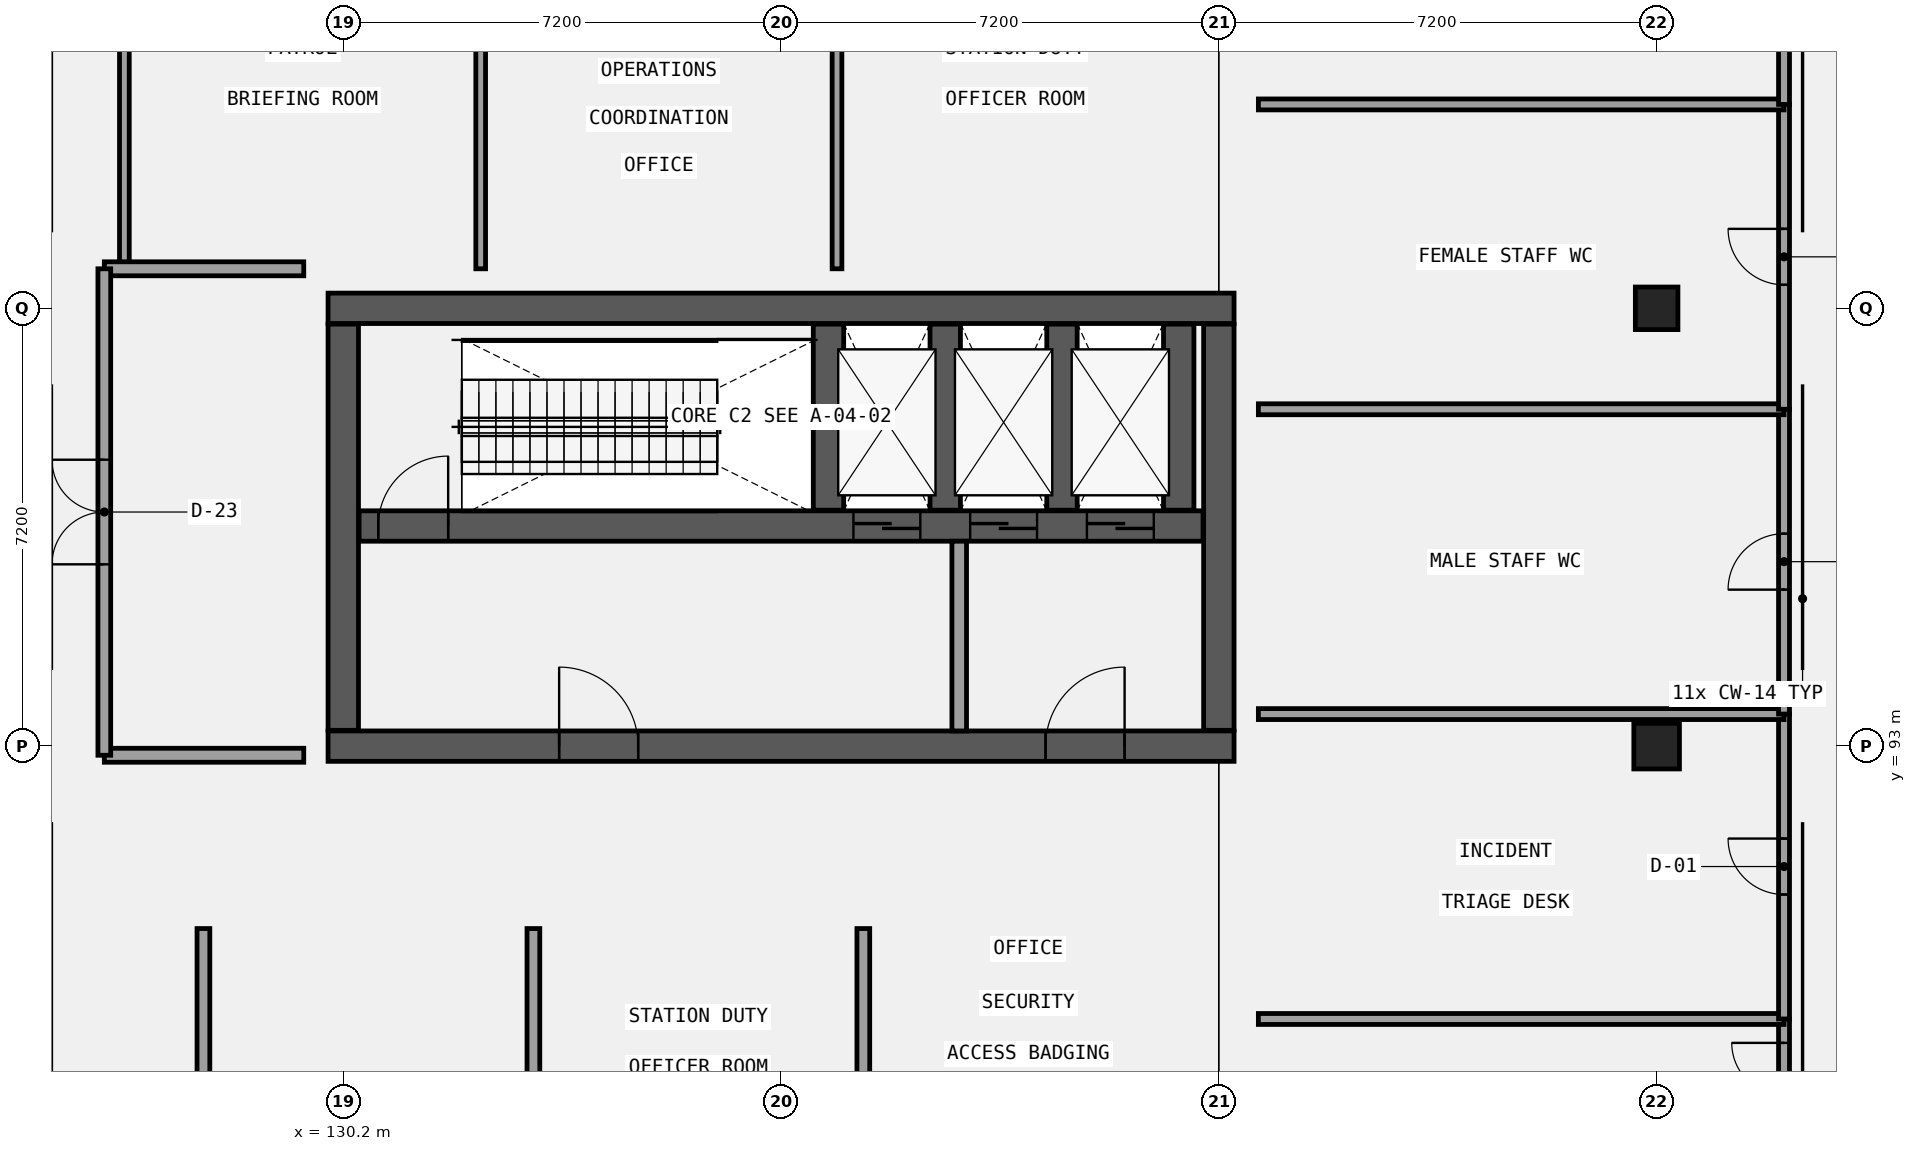
"""IFC4 building model, lengths in metres.
Left out: names, types, materials, properties, quantities, classifications, styles, units other than length and angle.
Written with IfcOpenShell. Run it as: python <this file> out.ifc"""

import sys

from ifc_helpers import new_model, si_unit, direction, frame, frame_2d, origin, origin_2d, place, context, subcontext, project, spatial, rectangle, extrude, element, fill, save


model = new_model("IFC4")
c1 = context("Model", 3, precision=1e-05, world=origin(), true_north=direction((0.0, 1.0)))
c2 = subcontext(c1, "Body", "Model", "MODEL_VIEW")
j1 = project(units=[si_unit("LENGTHUNIT", "METRE"), si_unit("PLANEANGLEUNIT", "RADIAN")], contexts=[c1])
p1 = place(None, origin())
s1 = spatial("IfcSite", under=j1, at=p1, CompositionType="ELEMENT")
p2 = place(p1, origin())
s2 = spatial("IfcBuilding", under=s1, at=p2, CompositionType="ELEMENT")
p3 = place(p2, origin())
s3 = spatial("IfcBuildingStorey", under=s2, at=p3, CompositionType="ELEMENT", Elevation=0.0)
p4 = place(p3, frame((129.95, 100.2, 0.0), z_axis=(0.0, 0.0, 1.0), x_axis=(1.0, 0.0, 0.0)))
e1 = element("IfcWall", 1, at=p4, inside=s3, PredefinedType="SHEAR", context=c2, shape_type="SweptSolid", body=[
    extrude(rectangle(XDim=14.9, YDim=0.5, at=frame_2d((7.45, 0.0))), origin(), (0.0, 0.0, 1.0), 5.4),
])
p5 = place(p3, frame((129.95, 93.0, 0.0), z_axis=(0.0, 0.0, 1.0), x_axis=(1.0, 0.0, 0.0)))
e2 = element("IfcWall", 2, at=p5, inside=s3, PredefinedType="SHEAR", context=c2, shape_type="SweptSolid", body=[
    extrude(rectangle(XDim=14.9, YDim=0.5, at=frame_2d((7.45, 0.0))), origin(), (0.0, 0.0, 1.0), 5.4),
])
p6 = place(p5, frame((3.8, 0.0, 0.0)))
e3 = element("IfcOpeningElement", 3, at=p6, cuts=e2, PredefinedType="OPENING", context=c2, shape_type="SweptSolid", body=[
    extrude(rectangle(XDim=1.3, YDim=2.2, at=frame_2d((0.65, 1.1))), frame((0.0, 0.26, 0.0), z_axis=(0.0, -1.0, 0.0), x_axis=(1.0, 0.0, 0.0)), (0.0, 0.0, 1.0), 0.52),
])
p7 = place(p5, frame((11.8, 0.0, 0.0)))
e4 = element("IfcOpeningElement", 4, at=p7, cuts=e2, PredefinedType="OPENING", context=c2, shape_type="SweptSolid", body=[
    extrude(rectangle(XDim=1.3, YDim=2.2, at=frame_2d((0.65, 1.1))), frame((0.0, 0.26, 0.0), z_axis=(0.0, -1.0, 0.0), x_axis=(1.0, 0.0, 0.0)), (0.0, 0.0, 1.0), 0.52),
])
for number, where, z_axis, x_axis in (
    (5, (130.2, 93.26, 0.0), (0.0, 0.0, 1.0), (0.0, 1.0, 0.0)),
    (6, (144.6, 93.26, 0.0), (0.0, 0.0, 1.0), (0.0, 1.0, 0.0)),
):
    element("IfcWall", number, at=place(p3, frame(where, z_axis=z_axis, x_axis=x_axis)), inside=s3, PredefinedType="SHEAR", context=c2, shape_type="SweptSolid", body=[
        extrude(rectangle(XDim=6.68, YDim=0.5, at=frame_2d((3.34, 0.0))), origin(), (0.0, 0.0, 1.0), 5.4),
    ])
p8 = place(p3, frame((130.46, 96.62, 0.0), z_axis=(0.0, 0.0, 1.0), x_axis=(1.0, 0.0, 0.0)))
e7 = element("IfcWall", 7, at=p8, inside=s3, PredefinedType="SHEAR", context=c2, shape_type="SweptSolid", body=[
    extrude(rectangle(XDim=13.88, YDim=0.5, at=frame_2d((6.94, 0.0))), origin(), (0.0, 0.0, 1.0), 5.4),
])
p9 = place(p8, frame((8.13, 0.0, 0.0)))
e8 = element("IfcOpeningElement", 8, at=p9, cuts=e7, PredefinedType="OPENING", context=c2, shape_type="SweptSolid", body=[
    extrude(rectangle(XDim=1.1, YDim=2.15, at=frame_2d((0.55, 1.075))), frame((0.0, 0.26, 0.0), z_axis=(0.0, -1.0, 0.0), x_axis=(1.0, 0.0, 0.0)), (0.0, 0.0, 1.0), 0.52),
])
p10 = place(p8, frame((10.05, 0.0, 0.0)))
e9 = element("IfcOpeningElement", 9, at=p10, cuts=e7, PredefinedType="OPENING", context=c2, shape_type="SweptSolid", body=[
    extrude(rectangle(XDim=1.1, YDim=2.15, at=frame_2d((0.55, 1.075))), frame((0.0, 0.26, 0.0), z_axis=(0.0, -1.0, 0.0), x_axis=(1.0, 0.0, 0.0)), (0.0, 0.0, 1.0), 0.52),
])
p11 = place(p8, frame((11.97, 0.0, 0.0)))
e10 = element("IfcOpeningElement", 10, at=p11, cuts=e7, PredefinedType="OPENING", context=c2, shape_type="SweptSolid", body=[
    extrude(rectangle(XDim=1.1, YDim=2.15, at=frame_2d((0.55, 1.075))), frame((0.0, 0.26, 0.0), z_axis=(0.0, -1.0, 0.0), x_axis=(1.0, 0.0, 0.0)), (0.0, 0.0, 1.0), 0.52),
])
p12 = place(p8, frame((0.315, 0.0, 0.0)))
e11 = element("IfcOpeningElement", 11, at=p12, cuts=e7, PredefinedType="OPENING", context=c2, shape_type="SweptSolid", body=[
    extrude(rectangle(XDim=1.15, YDim=2.15, at=frame_2d((0.575, 1.075))), frame((0.0, 0.26, 0.0), z_axis=(0.0, -1.0, 0.0), x_axis=(1.0, 0.0, 0.0)), (0.0, 0.0, 1.0), 0.52),
])
for number, where, z_axis, x_axis in (
    (12, (138.18, 96.88, 0.0), (0.0, 0.0, 1.0), (0.0, 1.0, 0.0)),
    (13, (140.1, 96.88, 0.0), (0.0, 0.0, 1.0), (0.0, 1.0, 0.0)),
    (14, (142.02, 96.88, 0.0), (0.0, 0.0, 1.0), (0.0, 1.0, 0.0)),
    (15, (143.94, 96.88, 0.0), (0.0, 0.0, 1.0), (0.0, 1.0, 0.0)),
):
    element("IfcWall", number, at=place(p3, frame(where, z_axis=z_axis, x_axis=x_axis)), inside=s3, PredefinedType="SHEAR", context=c2, shape_type="SweptSolid", body=[
        extrude(rectangle(XDim=3.06, YDim=0.5, at=frame_2d((1.53, 0.0))), origin(), (0.0, 0.0, 1.0), 5.4),
    ])
p13 = place(p3, frame((151.8, 93.0, 0.0), z_axis=(0.0, 0.0, 1.0), x_axis=(1.0, 0.0, 0.0)))
e16 = element("IfcColumn", 16, at=p13, inside=s3, PredefinedType="COLUMN", context=c2, shape_type="SweptSolid", body=[
    extrude(rectangle(XDim=0.75, YDim=0.75, at=origin_2d()), origin(), (0.0, 0.0, 1.0), 5.4),
])
p14 = place(p3, frame((151.8, 100.2, 0.0), z_axis=(0.0, 0.0, 1.0), x_axis=(1.0, 0.0, 0.0)))
e17 = element("IfcColumn", 17, at=p14, inside=s3, PredefinedType="COLUMN", context=c2, shape_type="SweptSolid", body=[
    extrude(rectangle(XDim=0.7, YDim=0.7, at=origin_2d()), origin(), (0.0, 0.0, 1.0), 5.4),
])
p15 = place(p3, frame((140.33, 93.25, 0.0), z_axis=(0.0, 0.0, 1.0), x_axis=(0.0, 1.0, 0.0)))
e18 = element("IfcWall", 18, at=p15, inside=s3, PredefinedType="SOLIDWALL", context=c2, shape_type="SweptSolid", body=[
    extrude(rectangle(XDim=3.12, YDim=0.24, at=frame_2d((1.56, 0.0))), origin(), (0.0, 0.0, 1.0), 5.09),
])
for number, where, z_axis, x_axis in (
    (19, (126.6, 100.85, 0.0), (0.0, 0.0, 1.0), (0.0, 1.0, 0.0)),
    (20, (132.46, 100.85, 0.0), (0.0, 0.0, 1.0), (0.0, 1.0, 0.0)),
    (21, (138.32, 100.85, 0.0), (0.0, 0.0, 1.0), (0.0, 1.0, 0.0)),
):
    element("IfcWall", number, at=place(p3, frame(where, z_axis=z_axis, x_axis=x_axis)), inside=s3, PredefinedType="PARTITIONING", context=c2, shape_type="SweptSolid", body=[
        extrude(rectangle(XDim=7.29, YDim=0.16, at=frame_2d((3.645, 0.0))), origin(), (0.0, 0.0, 1.0), 5.12),
    ])
for number, where, z_axis, x_axis in (
    (22, (127.9, 86.12, 0.0), (0.0, 0.0, 1.0), (0.0, 1.0, 0.0)),
    (23, (133.327, 86.12, 0.0), (0.0, 0.0, 1.0), (0.0, 1.0, 0.0)),
    (24, (138.753, 86.12, 0.0), (0.0, 0.0, 1.0), (0.0, 1.0, 0.0)),
):
    element("IfcWall", number, at=place(p3, frame(where, z_axis=z_axis, x_axis=x_axis)), inside=s3, PredefinedType="PARTITIONING", context=c2, shape_type="SweptSolid", body=[
        extrude(rectangle(XDim=3.88, YDim=0.21, at=frame_2d((1.94, 0.0))), origin(), (0.0, 0.0, 1.0), 5.12),
    ])
p16 = place(p3, frame((126.27, 92.85, 0.0), z_axis=(0.0, 0.0, 1.0), x_axis=(1.0, 0.0, 0.0)))
e25 = element("IfcWall", 25, at=p16, inside=s3, PredefinedType="PARTITIONING", context=c2, shape_type="SweptSolid", body=[
    extrude(rectangle(XDim=3.28, YDim=0.23, at=frame_2d((1.64, 0.0))), origin(), (0.0, 0.0, 1.0), 4.32),
])
p17 = place(p3, frame((126.27, 100.85, 0.0), z_axis=(0.0, 0.0, 1.0), x_axis=(1.0, 0.0, 0.0)))
e26 = element("IfcWall", 26, at=p17, inside=s3, PredefinedType="PARTITIONING", context=c2, shape_type="SweptSolid", body=[
    extrude(rectangle(XDim=3.28, YDim=0.23, at=frame_2d((1.64, 0.0))), origin(), (0.0, 0.0, 1.0), 5.12),
])
p18 = place(p3, frame((126.27, 92.85, 0.0), z_axis=(0.0, 0.0, 1.0), x_axis=(0.0, 1.0, 0.0)))
e27 = element("IfcWall", 27, at=p18, inside=s3, PredefinedType="PARTITIONING", context=c2, shape_type="SweptSolid", body=[
    extrude(rectangle(XDim=8.0, YDim=0.21, at=frame_2d((4.0, 0.0))), origin(), (0.0, 0.0, 1.0), 5.12),
])
p19 = place(p18, frame((3.14, 0.0, 0.0)))
e28 = element("IfcOpeningElement", 28, at=p19, cuts=e27, PredefinedType="OPENING", context=c2, shape_type="SweptSolid", body=[
    extrude(rectangle(XDim=1.72, YDim=2.22, at=frame_2d((0.86, 1.11))), frame((0.0, 0.115, 0.0), z_axis=(0.0, -1.0, 0.0), x_axis=(1.0, 0.0, 0.0)), (0.0, 0.0, 1.0), 0.23),
])
p20 = place(p3, frame((153.895, 83.5, 0.0), z_axis=(0.0, 0.0, 1.0), x_axis=(0.0, 1.0, 0.0)))
e29 = element("IfcWall", 29, at=p20, inside=s3, PredefinedType="PARTITIONING", context=c2, shape_type="SweptSolid", body=[
    extrude(rectangle(XDim=5.013, YDim=0.18, at=frame_2d((2.506, 0.0))), origin(), (0.0, 0.0, 1.0), 5.12),
])
p21 = place(p20, frame((2.9, 0.0, 0.0)))
e30 = element("IfcOpeningElement", 30, at=p21, cuts=e29, PredefinedType="OPENING", context=c2, shape_type="SweptSolid", body=[
    extrude(rectangle(XDim=1.72, YDim=2.35, at=frame_2d((0.86, 1.175))), frame((0.0, 0.1, 0.0), z_axis=(0.0, -1.0, 0.0), x_axis=(1.0, 0.0, 0.0)), (0.0, 0.0, 1.0), 0.2),
])
p22 = place(p3, frame((145.25, 88.513, 0.0), z_axis=(0.0, 0.0, 1.0), x_axis=(1.0, 0.0, 0.0)))
e31 = element("IfcWall", 31, at=p22, inside=s3, PredefinedType="PARTITIONING", context=c2, shape_type="SweptSolid", body=[
    extrude(rectangle(XDim=8.645, YDim=0.18, at=frame_2d((4.323, 0.0))), origin(), (0.0, 0.0, 1.0), 5.12),
])
p23 = place(p3, frame((153.895, 88.513, 0.0), z_axis=(0.0, 0.0, 1.0), x_axis=(0.0, 1.0, 0.0)))
e32 = element("IfcWall", 32, at=p23, inside=s3, PredefinedType="PARTITIONING", context=c2, shape_type="SweptSolid", body=[
    extrude(rectangle(XDim=5.014, YDim=0.18, at=frame_2d((2.507, 0.0))), origin(), (0.0, 0.0, 1.0), 5.12),
])
p24 = place(p23, frame((2.047, 0.0, 0.0)))
e33 = element("IfcOpeningElement", 33, at=p24, cuts=e32, PredefinedType="OPENING", context=c2, shape_type="SweptSolid", body=[
    extrude(rectangle(XDim=0.92, YDim=2.1, at=frame_2d((0.46, 1.05))), frame((0.0, 0.1, 0.0), z_axis=(0.0, -1.0, 0.0), x_axis=(1.0, 0.0, 0.0)), (0.0, 0.0, 1.0), 0.2),
])
p25 = place(p3, frame((145.25, 93.527, 0.0), z_axis=(0.0, 0.0, 1.0), x_axis=(1.0, 0.0, 0.0)))
e34 = element("IfcWall", 34, at=p25, inside=s3, PredefinedType="PARTITIONING", context=c2, shape_type="SweptSolid", body=[
    extrude(rectangle(XDim=8.645, YDim=0.18, at=frame_2d((4.323, 0.0))), origin(), (0.0, 0.0, 1.0), 5.12),
])
p26 = place(p3, frame((153.895, 93.527, 0.0), z_axis=(0.0, 0.0, 1.0), x_axis=(0.0, 1.0, 0.0)))
e35 = element("IfcWall", 35, at=p26, inside=s3, PredefinedType="PARTITIONING", context=c2, shape_type="SweptSolid", body=[
    extrude(rectangle(XDim=5.013, YDim=0.18, at=frame_2d((2.506, 0.0))), origin(), (0.0, 0.0, 1.0), 5.12),
])
p27 = place(p26, frame((2.046, 0.0, 0.0)))
e36 = element("IfcOpeningElement", 36, at=p27, cuts=e35, PredefinedType="OPENING", context=c2, shape_type="SweptSolid", body=[
    extrude(rectangle(XDim=0.92, YDim=2.22, at=frame_2d((0.46, 1.11))), frame((0.0, 0.1, 0.0), z_axis=(0.0, -1.0, 0.0), x_axis=(1.0, 0.0, 0.0)), (0.0, 0.0, 1.0), 0.2),
])
p28 = place(p3, frame((145.25, 98.54, 0.0), z_axis=(0.0, 0.0, 1.0), x_axis=(1.0, 0.0, 0.0)))
e37 = element("IfcWall", 37, at=p28, inside=s3, PredefinedType="PARTITIONING", context=c2, shape_type="SweptSolid", body=[
    extrude(rectangle(XDim=8.645, YDim=0.18, at=frame_2d((4.323, 0.0))), origin(), (0.0, 0.0, 1.0), 4.57),
])
p29 = place(p3, frame((153.895, 98.54, 0.0), z_axis=(0.0, 0.0, 1.0), x_axis=(0.0, 1.0, 0.0)))
e38 = element("IfcWall", 38, at=p29, inside=s3, PredefinedType="PARTITIONING", context=c2, shape_type="SweptSolid", body=[
    extrude(rectangle(XDim=5.013, YDim=0.18, at=frame_2d((2.506, 0.0))), origin(), (0.0, 0.0, 1.0), 5.12),
])
p30 = place(p29, frame((2.046, 0.0, 0.0)))
e39 = element("IfcOpeningElement", 39, at=p30, cuts=e38, PredefinedType="OPENING", context=c2, shape_type="SweptSolid", body=[
    extrude(rectangle(XDim=0.92, YDim=2.35, at=frame_2d((0.46, 1.175))), frame((0.0, 0.1, 0.0), z_axis=(0.0, -1.0, 0.0), x_axis=(1.0, 0.0, 0.0)), (0.0, 0.0, 1.0), 0.2),
])
p31 = place(p3, frame((145.25, 103.553, 0.0), z_axis=(0.0, 0.0, 1.0), x_axis=(1.0, 0.0, 0.0)))
e40 = element("IfcWall", 40, at=p31, inside=s3, PredefinedType="PARTITIONING", context=c2, shape_type="SweptSolid", body=[
    extrude(rectangle(XDim=8.645, YDim=0.18, at=frame_2d((4.323, 0.0))), origin(), (0.0, 0.0, 1.0), 4.57),
])
p32 = place(p3, frame((153.895, 103.553, 0.0), z_axis=(0.0, 0.0, 1.0), x_axis=(0.0, 1.0, 0.0)))
e41 = element("IfcWall", 41, at=p32, inside=s3, PredefinedType="PARTITIONING", context=c2, shape_type="SweptSolid", body=[
    extrude(rectangle(XDim=5.014, YDim=0.18, at=frame_2d((2.507, 0.0))), origin(), (0.0, 0.0, 1.0), 5.12),
])
p33 = place(p32, frame((2.017, 0.0, 0.0)))
e42 = element("IfcOpeningElement", 42, at=p33, cuts=e41, PredefinedType="OPENING", context=c2, shape_type="SweptSolid", body=[
    extrude(rectangle(XDim=0.98, YDim=2.1, at=frame_2d((0.49, 1.05))), frame((0.0, 0.1, 0.0), z_axis=(0.0, -1.0, 0.0), x_axis=(1.0, 0.0, 0.0)), (0.0, 0.0, 1.0), 0.2),
])
p34 = place(p9, frame((1.1, 0.0, 0.0), z_axis=(0.0, 0.0, 1.0), x_axis=(-1.0, 0.0, 0.0)))
e43 = element("IfcDoor", 43, at=p34, inside=s3, OperationType="DOUBLE_DOOR_SLIDING", PredefinedType="DOOR", context=c2, shape_type="SweptSolid", body=[
    extrude(rectangle(XDim=1.1, YDim=2.15, at=frame_2d((0.55, 1.075))), frame((0.0, 0.025, 0.0), z_axis=(0.0, -1.0, 0.0), x_axis=(1.0, 0.0, 0.0)), (0.0, 0.0, 1.0), 0.05),
])
fill(e8, e43)
p35 = place(p10, frame((1.1, 0.0, 0.0), z_axis=(0.0, 0.0, 1.0), x_axis=(-1.0, 0.0, 0.0)))
e44 = element("IfcDoor", 44, at=p35, inside=s3, OperationType="DOUBLE_DOOR_SLIDING", PredefinedType="DOOR", context=c2, shape_type="SweptSolid", body=[
    extrude(rectangle(XDim=1.1, YDim=2.15, at=frame_2d((0.55, 1.075))), frame((0.0, 0.025, 0.0), z_axis=(0.0, -1.0, 0.0), x_axis=(1.0, 0.0, 0.0)), (0.0, 0.0, 1.0), 0.05),
])
fill(e9, e44)
p36 = place(p11, frame((1.1, 0.0, 0.0), z_axis=(0.0, 0.0, 1.0), x_axis=(-1.0, 0.0, 0.0)))
e45 = element("IfcDoor", 45, at=p36, inside=s3, OperationType="DOUBLE_DOOR_SLIDING", PredefinedType="DOOR", context=c2, shape_type="SweptSolid", body=[
    extrude(rectangle(XDim=1.1, YDim=2.15, at=frame_2d((0.55, 1.075))), frame((0.0, 0.025, 0.0), z_axis=(0.0, -1.0, 0.0), x_axis=(1.0, 0.0, 0.0)), (0.0, 0.0, 1.0), 0.05),
])
fill(e10, e45)
p37 = place(p12, origin())
e46 = element("IfcDoor", 46, at=p37, inside=s3, OperationType="SINGLE_SWING_RIGHT", PredefinedType="DOOR", context=c2, shape_type="SweptSolid", body=[
    extrude(rectangle(XDim=1.15, YDim=2.15, at=frame_2d((0.575, 1.075))), frame((0.0, 0.025, 0.0), z_axis=(0.0, -1.0, 0.0), x_axis=(1.0, 0.0, 0.0)), (0.0, 0.0, 1.0), 0.05),
])
fill(e11, e46)
p38 = place(p6, frame((1.3, 0.0, 0.0), z_axis=(0.0, 0.0, 1.0), x_axis=(-1.0, 0.0, 0.0)))
e47 = element("IfcDoor", 47, at=p38, inside=s3, OperationType="SINGLE_SWING_LEFT", PredefinedType="DOOR", context=c2, shape_type="SweptSolid", body=[
    extrude(rectangle(XDim=1.3, YDim=2.2, at=frame_2d((0.65, 1.1))), frame((0.0, 0.025, 0.0), z_axis=(0.0, -1.0, 0.0), x_axis=(1.0, 0.0, 0.0)), (0.0, 0.0, 1.0), 0.05),
])
fill(e3, e47)
p39 = place(p7, frame((1.3, 0.0, 0.0), z_axis=(0.0, 0.0, 1.0), x_axis=(-1.0, 0.0, 0.0)))
e48 = element("IfcDoor", 48, at=p39, inside=s3, OperationType="SINGLE_SWING_RIGHT", PredefinedType="DOOR", context=c2, shape_type="SweptSolid", body=[
    extrude(rectangle(XDim=1.3, YDim=2.2, at=frame_2d((0.65, 1.1))), frame((0.0, 0.025, 0.0), z_axis=(0.0, -1.0, 0.0), x_axis=(1.0, 0.0, 0.0)), (0.0, 0.0, 1.0), 0.05),
])
fill(e4, e48)
p40 = place(p19, origin())
e49 = element("IfcDoor", 49, at=p40, inside=s3, OperationType="DOUBLE_DOOR_SINGLE_SWING", PredefinedType="DOOR", context=c2, shape_type="SweptSolid", body=[
    extrude(rectangle(XDim=1.72, YDim=2.22, at=frame_2d((0.86, 1.11))), frame((0.0, 0.025, 0.0), z_axis=(0.0, -1.0, 0.0), x_axis=(1.0, 0.0, 0.0)), (0.0, 0.0, 1.0), 0.05),
])
fill(e28, e49)
p41 = place(p21, frame((1.72, 0.0, 0.0), z_axis=(0.0, 0.0, 1.0), x_axis=(-1.0, 0.0, 0.0)))
e50 = element("IfcDoor", 50, at=p41, inside=s3, OperationType="DOUBLE_DOOR_SINGLE_SWING", PredefinedType="DOOR", context=c2, shape_type="SweptSolid", body=[
    extrude(rectangle(XDim=1.72, YDim=2.35, at=frame_2d((0.86, 1.175))), frame((0.0, 0.025, 0.0), z_axis=(0.0, -1.0, 0.0), x_axis=(1.0, 0.0, 0.0)), (0.0, 0.0, 1.0), 0.05),
])
fill(e30, e50)
p42 = place(p24, frame((0.92, 0.0, 0.0), z_axis=(0.0, 0.0, 1.0), x_axis=(-1.0, 0.0, 0.0)))
e51 = element("IfcDoor", 51, at=p42, inside=s3, OperationType="SINGLE_SWING_RIGHT", PredefinedType="DOOR", context=c2, shape_type="SweptSolid", body=[
    extrude(rectangle(XDim=0.92, YDim=2.1, at=frame_2d((0.46, 1.05))), frame((0.0, 0.025, 0.0), z_axis=(0.0, -1.0, 0.0), x_axis=(1.0, 0.0, 0.0)), (0.0, 0.0, 1.0), 0.05),
])
fill(e33, e51)
p43 = place(p27, frame((0.92, 0.0, 0.0), z_axis=(0.0, 0.0, 1.0), x_axis=(-1.0, 0.0, 0.0)))
e52 = element("IfcDoor", 52, at=p43, inside=s3, OperationType="SINGLE_SWING_LEFT", PredefinedType="DOOR", context=c2, shape_type="SweptSolid", body=[
    extrude(rectangle(XDim=0.92, YDim=2.22, at=frame_2d((0.46, 1.11))), frame((0.0, 0.025, 0.0), z_axis=(0.0, -1.0, 0.0), x_axis=(1.0, 0.0, 0.0)), (0.0, 0.0, 1.0), 0.05),
])
fill(e36, e52)
p44 = place(p30, frame((0.92, 0.0, 0.0), z_axis=(0.0, 0.0, 1.0), x_axis=(-1.0, 0.0, 0.0)))
e53 = element("IfcDoor", 53, at=p44, inside=s3, OperationType="SINGLE_SWING_RIGHT", PredefinedType="DOOR", context=c2, shape_type="SweptSolid", body=[
    extrude(rectangle(XDim=0.92, YDim=2.35, at=frame_2d((0.46, 1.175))), frame((0.0, 0.025, 0.0), z_axis=(0.0, -1.0, 0.0), x_axis=(1.0, 0.0, 0.0)), (0.0, 0.0, 1.0), 0.05),
])
fill(e39, e53)
save(model, sys.argv[1])
